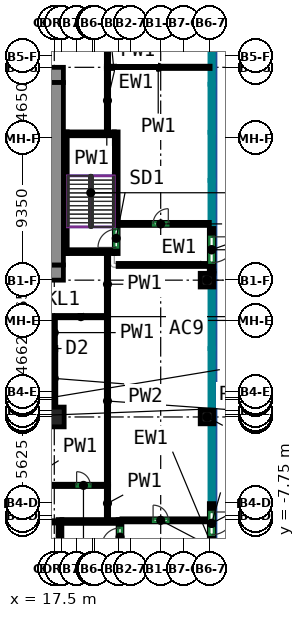
"""IFC4 building model, lengths in metres.
Left out: names, types, materials, properties, quantities, classifications, styles, units other than length and angle.
Written with IfcOpenShell. Run it as: python <this file> out.ifc"""

import sys

from ifc_helpers import new_model, si_unit, direction, frame, frame_2d, origin, origin_2d, place, context, subcontext, project, spatial, rectangle, extrude, source, transform, mapped, element, fill, save


model = new_model("IFC4")
c1 = context("Model", 3, precision=1e-05, world=origin(), true_north=direction((0.0, 1.0)))
c2 = subcontext(c1, "Body", "Model", "MODEL_VIEW")
j1 = project(units=[si_unit("LENGTHUNIT", "METRE"), si_unit("PLANEANGLEUNIT", "RADIAN")], contexts=[c1])
p1 = place(None, origin())
s1 = spatial("IfcSite", under=j1, at=p1, CompositionType="ELEMENT")
p2 = place(p1, origin())
s2 = spatial("IfcBuilding", under=s1, at=p2, CompositionType="ELEMENT")
p3 = place(p2, origin())
s3 = spatial("IfcBuildingStorey", under=s2, at=p3, CompositionType="ELEMENT", Elevation=0.0)
m1 = source(origin(), c2, "Body", "SweptSolid", [
    extrude(rectangle(XDim=1.3, YDim=1.3, at=origin_2d()), origin(), (0.0, 0.0, 1.0), 8.6),
])
p4 = place(p3, frame((17.5, -1.0, 0.0), z_axis=(0.0, 0.0, 1.0), x_axis=(1.0, 0.0, 0.0)))
e1 = element("IfcColumn", 1, at=p4, inside=s3, PredefinedType="COLUMN", context=c2, shape_type="MappedRepresentation", body=[
    mapped(m1, transform((0.0, 0.0, 0.0))),
])
m2 = source(origin(), c2, "Body", "SweptSolid", [
    extrude(rectangle(XDim=0.9, YDim=0.9, at=origin_2d()), origin(), (0.0, 0.0, 1.0), 8.6),
])
for number, where, z_axis, x_axis in (
    (2, (27.55, -1.0, 0.0), (0.0, 0.0, 1.0), (1.0, 0.0, 0.0)),
    (3, (27.55, 8.0, 0.0), (0.0, 0.0, 1.0), (1.0, 0.0, 0.0)),
):
    element("IfcColumn", number, at=place(p3, frame(where, z_axis=z_axis, x_axis=x_axis)), inside=s3, PredefinedType="COLUMN", context=c2, shape_type="MappedRepresentation", body=[
        mapped(m2, transform((0.0, 0.0, 0.0))),
    ])
m3 = source(origin(), c2, "Body", "SweptSolid", [
    extrude(rectangle(XDim=5.63, YDim=1.0, at=frame_2d((2.815, 0.0))), origin(), (0.0, 0.0, 1.0), 8.6),
])
p5 = place(p3, frame((12.47, 8.5, 0.0), z_axis=(0.0, 0.0, 1.0), x_axis=(1.0, 0.0, 0.0)))
e4 = element("IfcWall", 4, at=p5, inside=s3, PredefinedType="SHEAR", context=c2, shape_type="MappedRepresentation", body=[
    mapped(m3, transform((0.0, 0.0, 0.0))),
])
p6 = place(p5, frame((2.18, 0.0, 0.0)))
e5 = element("IfcOpeningElement", 5, at=p6, cuts=e4, PredefinedType="OPENING", context=c2, shape_type="SweptSolid", body=[
    extrude(rectangle(XDim=1.2, YDim=2.1, at=frame_2d((0.6, 1.05))), frame((0.0, 0.51, 0.0), z_axis=(0.0, -1.0, 0.0), x_axis=(1.0, 0.0, 0.0)), (0.0, 0.0, 1.0), 1.02),
])
m4 = source(origin(), c2, "Body", "SweptSolid", [
    extrude(rectangle(XDim=34.1, YDim=1.0, at=frame_2d((17.05, 0.0))), origin(), (0.0, 0.0, 1.0), 8.6),
])
p7 = place(p3, frame((-16.0, 21.5, 0.0), z_axis=(0.0, 0.0, 1.0), x_axis=(1.0, 0.0, 0.0)))
e6 = element("IfcWall", 6, at=p7, inside=s3, PredefinedType="SHEAR", context=c2, shape_type="MappedRepresentation", body=[
    mapped(m4, transform((0.0, 0.0, 0.0))),
])
p8 = place(p7, frame((8.52, 0.0, 0.0)))
e7 = element("IfcOpeningElement", 7, at=p8, cuts=e6, PredefinedType="OPENING", context=c2, shape_type="SweptSolid", body=[
    extrude(rectangle(XDim=0.9, YDim=2.1, at=frame_2d((0.45, 1.05))), frame((0.0, 0.51, 0.0), z_axis=(0.0, -1.0, 0.0), x_axis=(1.0, 0.0, 0.0)), (0.0, 0.0, 1.0), 1.02),
])
p9 = place(p7, frame((14.55, 0.0, 0.0)))
e8 = element("IfcOpeningElement", 8, at=p9, cuts=e6, PredefinedType="OPENING", context=c2, shape_type="SweptSolid", body=[
    extrude(rectangle(XDim=0.9, YDim=2.1, at=frame_2d((0.45, 1.05))), frame((0.0, 0.51, 0.0), z_axis=(0.0, -1.0, 0.0), x_axis=(1.0, 0.0, 0.0)), (0.0, 0.0, 1.0), 1.02),
])
p10 = place(p7, frame((19.374, 0.0, 0.0)))
e9 = element("IfcOpeningElement", 9, at=p10, cuts=e6, PredefinedType="OPENING", context=c2, shape_type="SweptSolid", body=[
    extrude(rectangle(XDim=0.9, YDim=2.1, at=frame_2d((0.45, 1.05))), frame((0.0, 0.51, 0.0), z_axis=(0.0, -1.0, 0.0), x_axis=(1.0, 0.0, 0.0)), (0.0, 0.0, 1.0), 1.02),
])
p11 = place(p7, frame((25.404, 0.0, 0.0)))
e10 = element("IfcOpeningElement", 10, at=p11, cuts=e6, PredefinedType="OPENING", context=c2, shape_type="SweptSolid", body=[
    extrude(rectangle(XDim=0.9, YDim=2.1, at=frame_2d((0.45, 1.05))), frame((0.0, 0.51, 0.0), z_axis=(0.0, -1.0, 0.0), x_axis=(1.0, 0.0, 0.0)), (0.0, 0.0, 1.0), 1.02),
])
p12 = place(p7, frame((2.525, 0.0, 0.0)))
e11 = element("IfcOpeningElement", 11, at=p12, cuts=e6, PredefinedType="OPENING", context=c2, shape_type="SweptSolid", body=[
    extrude(rectangle(XDim=0.9, YDim=2.1, at=frame_2d((0.45, 1.05))), frame((0.0, 0.51, 0.0), z_axis=(0.0, -1.0, 0.0), x_axis=(1.0, 0.0, 0.0)), (0.0, 0.0, 1.0), 1.02),
])
p13 = place(p7, frame((30.675, 0.0, 0.0)))
e12 = element("IfcOpeningElement", 12, at=p13, cuts=e6, PredefinedType="OPENING", context=c2, shape_type="SweptSolid", body=[
    extrude(rectangle(XDim=0.9, YDim=2.1, at=frame_2d((0.45, 1.05))), frame((0.0, 0.51, 0.0), z_axis=(0.0, -1.0, 0.0), x_axis=(1.0, 0.0, 0.0)), (0.0, 0.0, 1.0), 1.02),
])
m5 = source(origin(), c2, "Body", "SweptSolid", [
    extrude(rectangle(XDim=12.0, YDim=1.0, at=frame_2d((6.0, 0.0))), origin(), (0.0, 0.0, 1.0), 8.6),
])
p14 = place(p3, frame((17.6, 9.0, 0.0), z_axis=(0.0, 0.0, 1.0), x_axis=(0.0, 1.0, 0.0)))
e13 = element("IfcWall", 13, at=p14, inside=s3, PredefinedType="SHEAR", context=c2, shape_type="MappedRepresentation", body=[
    mapped(m5, transform((0.0, 0.0, 0.0))),
])
m6 = source(origin(), c2, "Body", "SweptSolid", [
    extrude(rectangle(XDim=8.0, YDim=0.25, at=frame_2d((4.0, 0.0))), origin(), (0.0, 0.0, 1.0), 8.6),
])
p15 = place(p3, frame((17.875, -15.75, 0.0), z_axis=(0.0, 0.0, 1.0), x_axis=(0.0, 1.0, 0.0)))
e14 = element("IfcWall", 14, at=p15, inside=s3, PredefinedType="SHEAR", context=c2, shape_type="MappedRepresentation", body=[
    mapped(m6, transform((0.0, 0.0, 0.0))),
])
p16 = place(p3, frame((21.825, -15.75, 0.0), z_axis=(0.0, 0.0, 1.0), x_axis=(0.0, 1.0, 0.0)))
e15 = element("IfcWall", 15, at=p16, inside=s3, PredefinedType="SHEAR", context=c2, shape_type="MappedRepresentation", body=[
    mapped(m6, transform((0.0, 0.0, 0.0))),
])
p17 = place(p16, frame((6.25, 0.0, 0.0)))
e16 = element("IfcOpeningElement", 16, at=p17, cuts=e15, PredefinedType="OPENING", context=c2, shape_type="SweptSolid", body=[
    extrude(rectangle(XDim=1.2, YDim=2.1, at=frame_2d((0.6, 1.05))), frame((0.0, 0.135, 0.0), z_axis=(0.0, -1.0, 0.0), x_axis=(1.0, 0.0, 0.0)), (0.0, 0.0, 1.0), 0.27),
])
m7 = source(origin(), c2, "Body", "SweptSolid", [
    extrude(rectangle(XDim=3.7, YDim=0.25, at=frame_2d((1.85, 0.0))), origin(), (0.0, 0.0, 1.0), 8.6),
])
p18 = place(p3, frame((18.0, -7.875, 0.0), z_axis=(0.0, 0.0, 1.0), x_axis=(1.0, 0.0, 0.0)))
e17 = element("IfcWall", 17, at=p18, inside=s3, PredefinedType="SHEAR", context=c2, shape_type="MappedRepresentation", body=[
    mapped(m7, transform((0.0, 0.0, 0.0))),
])
p19 = place(p3, frame((18.225, 9.75, 0.0), z_axis=(0.0, 0.0, 1.0), x_axis=(0.0, 1.0, 0.0)))
e18 = element("IfcWall", 18, at=p19, inside=s3, PredefinedType="SHEAR", context=c2, shape_type="MappedRepresentation", body=[
    mapped(m6, transform((0.0, 0.0, 0.0))),
])
p20 = place(p3, frame((21.575, 9.75, 0.0), z_axis=(0.0, 0.0, 1.0), x_axis=(0.0, 1.0, 0.0)))
e19 = element("IfcWall", 19, at=p20, inside=s3, PredefinedType="SHEAR", context=c2, shape_type="MappedRepresentation", body=[
    mapped(m6, transform((0.0, 0.0, 0.0))),
])
p21 = place(p20, frame((0.4, 0.0, 0.0)))
e20 = element("IfcOpeningElement", 20, at=p21, cuts=e19, PredefinedType="OPENING", context=c2, shape_type="SweptSolid", body=[
    extrude(rectangle(XDim=1.2, YDim=2.1, at=frame_2d((0.6, 1.05))), frame((0.0, 0.135, 0.0), z_axis=(0.0, -1.0, 0.0), x_axis=(1.0, 0.0, 0.0)), (0.0, 0.0, 1.0), 0.27),
])
m8 = source(origin(), c2, "Body", "SweptSolid", [
    extrude(rectangle(XDim=3.1, YDim=0.25, at=frame_2d((1.55, 0.0))), origin(), (0.0, 0.0, 1.0), 8.6),
])
for number, where, z_axis, x_axis in (
    (21, (18.35, 9.875, 0.0), (0.0, 0.0, 1.0), (1.0, 0.0, 0.0)),
    (22, (18.35, 17.625, 0.0), (0.0, 0.0, 1.0), (1.0, 0.0, 0.0)),
):
    element("IfcWall", number, at=place(p3, frame(where, z_axis=z_axis, x_axis=x_axis)), inside=s3, PredefinedType="SHEAR", context=c2, shape_type="MappedRepresentation", body=[
        mapped(m8, transform((0.0, 0.0, 0.0))),
    ])
m9 = source(origin(), c2, "Body", "SweptSolid", [
    extrude(rectangle(XDim=5.75, YDim=0.2, at=frame_2d((2.875, 0.0))), origin(), (0.0, 0.0, 1.0), 8.6),
])
p22 = place(p3, frame((21.95, -7.8, 0.0), z_axis=(0.0, 0.0, 1.0), x_axis=(1.0, 0.0, 0.0)))
e23 = element("IfcWall", 23, at=p22, inside=s3, PredefinedType="SHEAR", context=c2, shape_type="MappedRepresentation", body=[
    mapped(m9, transform((0.0, 0.0, 0.0))),
])
p23 = place(p22, frame((2.05, 0.0, 0.0)))
e24 = element("IfcOpeningElement", 24, at=p23, cuts=e23, PredefinedType="OPENING", context=c2, shape_type="SweptSolid", body=[
    extrude(rectangle(XDim=1.0, YDim=2.1, at=frame_2d((0.5, 1.05))), frame((0.0, 0.11, 0.0), z_axis=(0.0, -1.0, 0.0), x_axis=(1.0, 0.0, 0.0)), (0.0, 0.0, 1.0), 0.22),
])
m10 = source(origin(), c2, "Body", "SweptSolid", [
    extrude(rectangle(XDim=6.0, YDim=0.2, at=frame_2d((3.0, 0.0))), origin(), (0.0, 0.0, 1.0), 8.6),
])
p24 = place(p3, frame((21.7, 9.0, 0.0), z_axis=(0.0, 0.0, 1.0), x_axis=(1.0, 0.0, 0.0)))
e25 = element("IfcWall", 25, at=p24, inside=s3, PredefinedType="SHEAR", context=c2, shape_type="MappedRepresentation", body=[
    mapped(m10, transform((0.0, 0.0, 0.0))),
])
p25 = place(p3, frame((21.7, 11.7, 0.0), z_axis=(0.0, 0.0, 1.0), x_axis=(1.0, 0.0, 0.0)))
e26 = element("IfcWall", 26, at=p25, inside=s3, PredefinedType="SHEAR", context=c2, shape_type="MappedRepresentation", body=[
    mapped(m10, transform((0.0, 0.0, 0.0))),
])
p26 = place(p25, frame((2.3, 0.0, 0.0)))
e27 = element("IfcOpeningElement", 27, at=p26, cuts=e26, PredefinedType="OPENING", context=c2, shape_type="SweptSolid", body=[
    extrude(rectangle(XDim=1.0, YDim=2.1, at=frame_2d((0.5, 1.05))), frame((0.0, 0.11, 0.0), z_axis=(0.0, -1.0, 0.0), x_axis=(1.0, 0.0, 0.0)), (0.0, 0.0, 1.0), 0.22),
])
m11 = source(origin(), c2, "Body", "SweptSolid", [
    extrude(rectangle(XDim=2.6, YDim=0.3, at=frame_2d((1.3, 0.0))), origin(), (0.0, 0.0, 1.0), 8.6),
])
p27 = place(p3, frame((27.85, -6.7, 0.0), z_axis=(0.0, 0.0, 1.0), x_axis=(0.0, -1.0, 0.0)))
e28 = element("IfcWall", 28, at=p27, inside=s3, PredefinedType="SOLIDWALL", context=c2, shape_type="MappedRepresentation", body=[
    mapped(m11, transform((0.0, 0.0, 0.0))),
])
p28 = place(p27, frame((0.55, 0.0, 0.0)))
e29 = element("IfcOpeningElement", 29, at=p28, cuts=e28, PredefinedType="OPENING", context=c2, shape_type="SweptSolid", body=[
    extrude(rectangle(XDim=1.5, YDim=2.4, at=frame_2d((0.75, 1.2))), frame((0.0, 0.16, 0.0), z_axis=(0.0, -1.0, 0.0), x_axis=(1.0, 0.0, 0.0)), (0.0, 0.0, 1.0), 0.32),
])
m12 = source(origin(), c2, "Body", "SweptSolid", [
    extrude(rectangle(XDim=0.15, YDim=0.3, at=frame_2d((0.075, 0.0))), origin(), (0.0, 0.0, 1.0), 8.6),
])
p29 = place(p3, frame((27.85, 8.45, 0.0), z_axis=(0.0, 0.0, 1.0), x_axis=(0.0, 1.0, 0.0)))
e30 = element("IfcWall", 30, at=p29, inside=s3, PredefinedType="SOLIDWALL", context=c2, shape_type="MappedRepresentation", body=[
    mapped(m12, transform((0.0, 0.0, 0.0))),
])
m13 = source(origin(), c2, "Body", "SweptSolid", [
    extrude(rectangle(XDim=2.8, YDim=0.3, at=frame_2d((1.4, 0.0))), origin(), (0.0, 0.0, 1.0), 8.6),
])
p30 = place(p3, frame((27.85, 11.4, 0.0), z_axis=(0.0, 0.0, 1.0), x_axis=(0.0, -1.0, 0.0)))
e31 = element("IfcWall", 31, at=p30, inside=s3, PredefinedType="SOLIDWALL", context=c2, shape_type="MappedRepresentation", body=[
    mapped(m13, transform((0.0, 0.0, 0.0))),
])
p31 = place(p30, frame((0.55, 0.0, 0.0)))
e32 = element("IfcOpeningElement", 32, at=p31, cuts=e31, PredefinedType="OPENING", context=c2, shape_type="SweptSolid", body=[
    extrude(rectangle(XDim=1.7, YDim=2.4, at=frame_2d((0.85, 1.2))), frame((0.0, 0.16, 0.0), z_axis=(0.0, -1.0, 0.0), x_axis=(1.0, 0.0, 0.0)), (0.0, 0.0, 1.0), 0.32),
])
p32 = place(p3, frame((21.0, -7.8, 0.0), z_axis=(0.0, 0.0, 1.0), x_axis=(0.0, 1.0, 0.0)))
e33 = element("IfcWall", 33, at=p32, inside=s3, PredefinedType="PARTITIONING", context=c2, shape_type="SweptSolid", body=[
    extrude(rectangle(XDim=2.235, YDim=0.15, at=frame_2d((1.118, 0.0))), origin(), (0.0, 0.0, 1.0), 8.6),
])
p33 = place(p3, frame((21.0, 5.665, 0.0), z_axis=(0.0, 0.0, 1.0), x_axis=(0.0, 1.0, 0.0)))
e34 = element("IfcWall", 34, at=p33, inside=s3, PredefinedType="PARTITIONING", context=c2, shape_type="SweptSolid", body=[
    extrude(rectangle(XDim=4.135, YDim=0.15, at=frame_2d((2.067, 0.0))), origin(), (0.0, 0.0, 1.0), 8.6),
])
p34 = place(p3, frame((21.0, -5.434, 0.0), z_axis=(0.0, 0.0, 1.0), x_axis=(0.0, 1.0, 0.0)))
e35 = element("IfcWall", 35, at=p34, inside=s3, PredefinedType="PARTITIONING", context=c2, shape_type="SweptSolid", body=[
    extrude(rectangle(XDim=10.968, YDim=0.15, at=frame_2d((5.484, 0.0))), origin(), (0.0, 0.0, 1.0), 8.6),
])
p35 = place(p3, frame((21.0, 17.7, 0.0), z_axis=(0.0, 0.0, 1.0), x_axis=(0.0, 1.0, 0.0)))
e36 = element("IfcWall", 36, at=p35, inside=s3, PredefinedType="PARTITIONING", context=c2, shape_type="SweptSolid", body=[
    extrude(rectangle(XDim=4.225, YDim=0.15, at=frame_2d((2.113, 0.0))), origin(), (0.0, 0.0, 1.0), 8.6),
])
p36 = place(p3, frame((27.75, 22.0, 0.0), z_axis=(0.0, 0.0, 1.0), x_axis=(-1.0, 0.0, 0.0)))
e37 = element("IfcWall", 37, at=p36, inside=s3, PredefinedType="PARTITIONING", context=c2, shape_type="SweptSolid", body=[
    extrude(rectangle(XDim=6.825, YDim=0.15, at=frame_2d((3.413, 0.0))), origin(), (0.0, 0.0, 1.0), 8.6),
])
p37 = place(p3, frame((9.325, -5.5, 0.0), z_axis=(0.0, 0.0, 1.0), x_axis=(1.0, 0.0, 0.0)))
e38 = element("IfcWall", 38, at=p37, inside=s3, PredefinedType="PARTITIONING", context=c2, shape_type="SweptSolid", body=[
    extrude(rectangle(XDim=11.75, YDim=0.15, at=frame_2d((5.875, 0.0))), origin(), (0.0, 0.0, 1.0), 8.6),
])
p38 = place(p37, frame((9.645, 0.0, 0.0)))
e39 = element("IfcOpeningElement", 39, at=p38, cuts=e38, PredefinedType="OPENING", context=c2, shape_type="SweptSolid", body=[
    extrude(rectangle(XDim=0.9, YDim=2.1, at=frame_2d((0.45, 1.05))), frame((0.0, 0.085, 0.0), z_axis=(0.0, -1.0, 0.0), x_axis=(1.0, 0.0, 0.0)), (0.0, 0.0, 1.0), 0.17),
])
p39 = place(p3, frame((9.325, -7.9, 0.0), z_axis=(0.0, 0.0, 1.0), x_axis=(1.0, 0.0, 0.0)))
e40 = element("IfcWall", 40, at=p39, inside=s3, PredefinedType="PARTITIONING", context=c2, shape_type="SweptSolid", body=[
    extrude(rectangle(XDim=8.475, YDim=0.15, at=frame_2d((4.238, 0.0))), origin(), (0.0, 0.0, 1.0), 8.6),
])
p40 = place(p39, frame((5.354, 0.0, 0.0)))
e41 = element("IfcOpeningElement", 41, at=p40, cuts=e40, PredefinedType="OPENING", context=c2, shape_type="SweptSolid", body=[
    extrude(rectangle(XDim=0.9, YDim=2.1, at=frame_2d((0.45, 1.05))), frame((0.0, 0.085, 0.0), z_axis=(0.0, -1.0, 0.0), x_axis=(1.0, 0.0, 0.0)), (0.0, 0.0, 1.0), 0.17),
])
p41 = place(p3, frame((21.0, 22.066, 0.0), z_axis=(0.0, 0.0, 1.0), x_axis=(0.0, 1.0, 0.0)))
e42 = element("IfcWall", 42, at=p41, inside=s3, PredefinedType="PARTITIONING", context=c2, shape_type="SweptSolid", body=[
    extrude(rectangle(XDim=2.359, YDim=0.15, at=frame_2d((1.18, 0.0))), origin(), (0.0, 0.0, 1.0), 8.6),
])
p42 = place(p3, frame((9.325, 3.5, 0.0), z_axis=(0.0, 0.0, 1.0), x_axis=(1.0, 0.0, 0.0)))
e43 = element("IfcWall", 43, at=p42, inside=s3, PredefinedType="PARTITIONING", context=c2, shape_type="SweptSolid", body=[
    extrude(rectangle(XDim=8.275, YDim=0.15, at=frame_2d((4.138, 0.0))), origin(), (0.0, 0.0, 1.0), 8.6),
])
p43 = place(p42, frame((6.164, 0.0, 0.0)))
e44 = element("IfcOpeningElement", 44, at=p43, cuts=e43, PredefinedType="OPENING", context=c2, shape_type="SweptSolid", body=[
    extrude(rectangle(XDim=0.9, YDim=2.1, at=frame_2d((0.45, 1.05))), frame((0.0, 0.085, 0.0), z_axis=(0.0, -1.0, 0.0), x_axis=(1.0, 0.0, 0.0)), (0.0, 0.0, 1.0), 0.17),
])
p44 = place(p3, frame((17.425, 5.6, 0.0), z_axis=(0.0, 0.0, 1.0), x_axis=(1.0, 0.0, 0.0)))
e45 = element("IfcWall", 45, at=p44, inside=s3, PredefinedType="PARTITIONING", context=c2, shape_type="SweptSolid", body=[
    extrude(rectangle(XDim=3.65, YDim=0.15, at=frame_2d((1.825, 0.0))), origin(), (0.0, 0.0, 1.0), 8.6),
])
p45 = place(p3, frame((17.5, 3.575, 0.0), z_axis=(0.0, 0.0, 1.0), x_axis=(0.0, 1.0, 0.0)))
e46 = element("IfcWall", 46, at=p45, inside=s3, PredefinedType="PARTITIONING", context=c2, shape_type="SweptSolid", body=[
    extrude(rectangle(XDim=1.95, YDim=0.15, at=frame_2d((0.975, 0.0))), origin(), (0.0, 0.0, 1.0), 8.6),
])
p46 = place(p3, frame((17.5, -0.35, 0.0), z_axis=(0.0, 0.0, 1.0), x_axis=(0.0, 1.0, 0.0)))
e47 = element("IfcWall", 47, at=p46, inside=s3, PredefinedType="PARTITIONING", context=c2, shape_type="SweptSolid", body=[
    extrude(rectangle(XDim=3.774, YDim=0.2, at=frame_2d((1.887, 0.0))), origin(), (0.0, 0.0, 1.0), 8.6),
])
p47 = place(p28, origin())
e48 = element("IfcDoor", 48, at=p47, inside=s3, OperationType="DOUBLE_DOOR_SINGLE_SWING", PredefinedType="DOOR", context=c2, shape_type="SweptSolid", body=[
    extrude(rectangle(XDim=1.5, YDim=2.4, at=frame_2d((0.75, 1.2))), frame((0.0, 0.025, 0.0), z_axis=(0.0, -1.0, 0.0), x_axis=(1.0, 0.0, 0.0)), (0.0, 0.0, 1.0), 0.05),
])
fill(e29, e48)
p48 = place(p31, origin())
e49 = element("IfcDoor", 49, at=p48, inside=s3, OperationType="DOUBLE_DOOR_SINGLE_SWING", PredefinedType="DOOR", context=c2, shape_type="SweptSolid", body=[
    extrude(rectangle(XDim=1.7, YDim=2.4, at=frame_2d((0.85, 1.2))), frame((0.0, 0.025, 0.0), z_axis=(0.0, -1.0, 0.0), x_axis=(1.0, 0.0, 0.0)), (0.0, 0.0, 1.0), 0.05),
])
fill(e32, e49)
p49 = place(p17, origin())
e50 = element("IfcDoor", 50, at=p49, inside=s3, OperationType="DOUBLE_DOOR_SINGLE_SWING", PredefinedType="DOOR", context=c2, shape_type="SweptSolid", body=[
    extrude(rectangle(XDim=1.2, YDim=2.1, at=frame_2d((0.6, 1.05))), frame((0.0, 0.025, 0.0), z_axis=(0.0, -1.0, 0.0), x_axis=(1.0, 0.0, 0.0)), (0.0, 0.0, 1.0), 0.05),
])
fill(e16, e50)
p50 = place(p23, origin())
e51 = element("IfcDoor", 51, at=p50, inside=s3, OperationType="SINGLE_SWING_LEFT", PredefinedType="DOOR", context=c2, shape_type="SweptSolid", body=[
    extrude(rectangle(XDim=1.0, YDim=2.1, at=frame_2d((0.5, 1.05))), frame((0.0, 0.025, 0.0), z_axis=(0.0, -1.0, 0.0), x_axis=(1.0, 0.0, 0.0)), (0.0, 0.0, 1.0), 0.05),
])
fill(e24, e51)
p51 = place(p21, origin())
e52 = element("IfcDoor", 52, at=p51, inside=s3, OperationType="DOUBLE_DOOR_SINGLE_SWING", PredefinedType="DOOR", context=c2, shape_type="SweptSolid", body=[
    extrude(rectangle(XDim=1.2, YDim=2.1, at=frame_2d((0.6, 1.05))), frame((0.0, 0.025, 0.0), z_axis=(0.0, -1.0, 0.0), x_axis=(1.0, 0.0, 0.0)), (0.0, 0.0, 1.0), 0.05),
])
fill(e20, e52)
p52 = place(p26, origin())
e53 = element("IfcDoor", 53, at=p52, inside=s3, OperationType="SINGLE_SWING_RIGHT", PredefinedType="DOOR", context=c2, shape_type="SweptSolid", body=[
    extrude(rectangle(XDim=1.0, YDim=2.1, at=frame_2d((0.5, 1.05))), frame((0.0, 0.025, 0.0), z_axis=(0.0, -1.0, 0.0), x_axis=(1.0, 0.0, 0.0)), (0.0, 0.0, 1.0), 0.05),
])
fill(e27, e53)
p53 = place(p38, origin())
e54 = element("IfcDoor", 54, at=p53, inside=s3, OperationType="SINGLE_SWING_LEFT", PredefinedType="DOOR", context=c2, shape_type="SweptSolid", body=[
    extrude(rectangle(XDim=0.9, YDim=2.1, at=frame_2d((0.45, 1.05))), frame((0.0, 0.025, 0.0), z_axis=(0.0, -1.0, 0.0), x_axis=(1.0, 0.0, 0.0)), (0.0, 0.0, 1.0), 0.05),
])
fill(e39, e54)
save(model, sys.argv[1])
